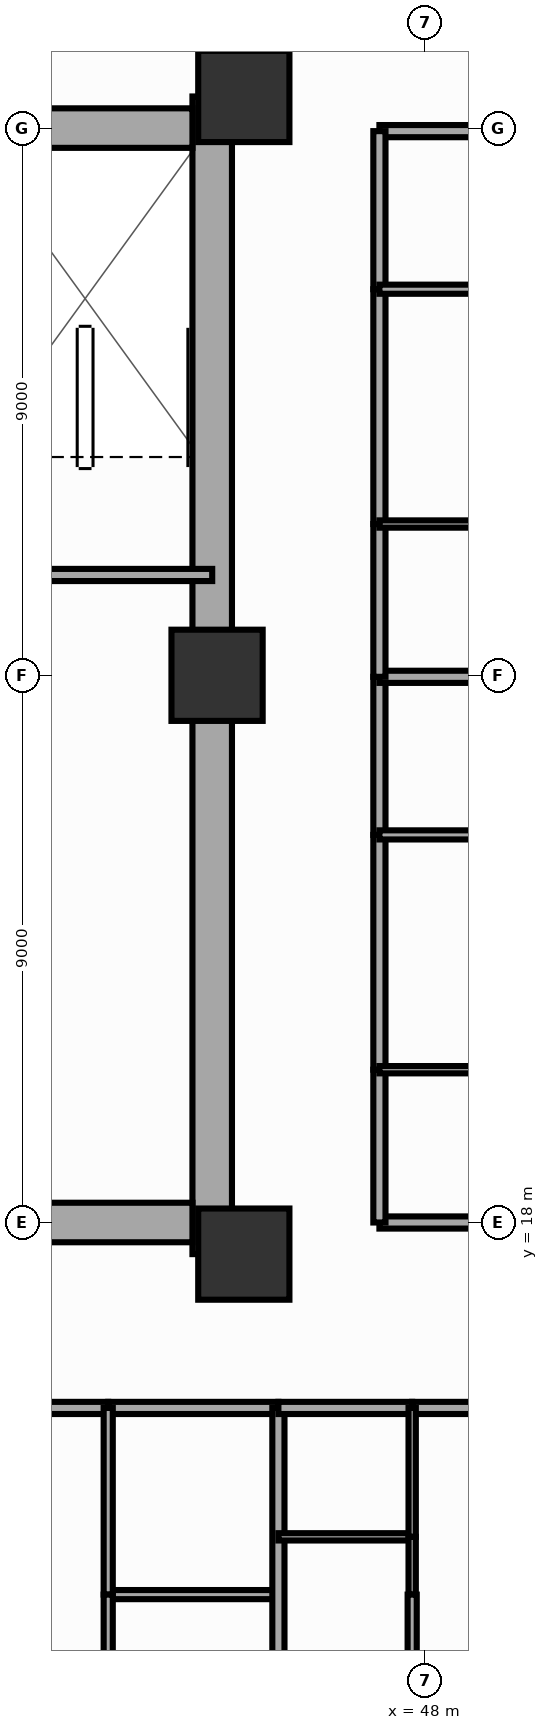
"""IFC4 building model, lengths in metres.
Left out: names, types, materials, properties, quantities, classifications, styles, units other than length and angle.
Written with IfcOpenShell. Run it as: python <this file> out.ifc"""

import sys

from ifc_helpers import new_model, si_unit, direction, frame, frame_2d, origin, origin_2d, place, context, subcontext, project, spatial, rectangle, extrude, source, transform, mapped, element, fill, save


model = new_model("IFC4")
c1 = context("Model", 3, precision=1e-05, world=origin(), true_north=direction((0.0, 1.0)))
c2 = subcontext(c1, "Body", "Model", "MODEL_VIEW")
j1 = project(units=[si_unit("LENGTHUNIT", "METRE"), si_unit("PLANEANGLEUNIT", "RADIAN")], contexts=[c1])
p1 = place(None, origin())
s1 = spatial("IfcSite", under=j1, at=p1, CompositionType="ELEMENT")
p2 = place(p1, origin())
s2 = spatial("IfcBuilding", under=s1, at=p2, CompositionType="ELEMENT")
p3 = place(p2, frame((0.0, 0.0, 19.4)))
s3 = spatial("IfcBuildingStorey", under=s2, at=p3, CompositionType="ELEMENT", Elevation=19.4)
p4 = place(p3, frame((44.5, 17.48, 0.0), z_axis=(0.0, 0.0, 1.0), x_axis=(0.0, 1.0, 0.0)))
e1 = element("IfcWall", 1, at=p4, inside=s3, PredefinedType="SHEAR", context=c2, shape_type="SweptSolid", body=[
    extrude(rectangle(XDim=19.04, YDim=0.65, at=frame_2d((9.52, 0.0))), origin(), (0.0, 0.0, 1.0), 3.0),
])
p5 = place(p4, frame((12.67, 0.0, 0.0), z_axis=(0.0, 0.0, 1.0), x_axis=(-1.0, 0.0, 0.0)))
e2 = element("IfcOpeningElement", 2, at=p5, cuts=e1, PredefinedType="OPENING", context=c2, shape_type="SweptSolid", body=[
    extrude(rectangle(XDim=1.1, YDim=2.15, at=frame_2d((0.55, 1.075))), frame((0.0, 0.337, 0.0), z_axis=(0.0, -1.0, 0.0), x_axis=(1.0, 0.0, 0.0)), (0.0, 0.0, 1.0), 0.674),
])
p6 = place(p3, frame((31.825, 18.0, 0.0), z_axis=(0.0, 0.0, 1.0), x_axis=(1.0, 0.0, 0.0)))
e3 = element("IfcWall", 3, at=p6, inside=s3, PredefinedType="SHEAR", context=c2, shape_type="SweptSolid", body=[
    extrude(rectangle(XDim=12.35, YDim=0.65, at=frame_2d((6.175, 0.0))), origin(), (0.0, 0.0, 1.0), 3.0),
])
p7 = place(p3, frame((31.825, 36.0, 0.0), z_axis=(0.0, 0.0, 1.0), x_axis=(1.0, 0.0, 0.0)))
e4 = element("IfcWall", 4, at=p7, inside=s3, PredefinedType="SHEAR", context=c2, shape_type="SweptSolid", body=[
    extrude(rectangle(XDim=12.35, YDim=0.65, at=frame_2d((6.175, 0.0))), origin(), (0.0, 0.0, 1.0), 3.0),
])
p8 = place(p7, frame((5.125, 0.0, 0.0), z_axis=(0.0, 0.0, 1.0), x_axis=(-1.0, 0.0, 0.0)))
e5 = element("IfcOpeningElement", 5, at=p8, cuts=e4, PredefinedType="OPENING", context=c2, shape_type="SweptSolid", body=[
    extrude(rectangle(XDim=1.4, YDim=2.15, at=frame_2d((0.7, 1.075))), frame((0.0, 0.337, 0.0), z_axis=(0.0, -1.0, 0.0), x_axis=(1.0, 0.0, 0.0)), (0.0, 0.0, 1.0), 0.674),
])
m1 = source(origin(), c2, "Body", "SweptSolid", [
    extrude(rectangle(XDim=1.5, YDim=1.5, at=origin_2d()), origin(), (0.0, 0.0, 1.0), 3.0),
])
for number, where, z_axis, x_axis in (
    (6, (45.02, 17.48, 0.0), (0.0, 0.0, 1.0), (1.0, 0.0, 0.0)),
    (7, (45.02, 36.52, 0.0), (0.0, 0.0, 1.0), (1.0, 0.0, 0.0)),
    (8, (44.58, 27.0, 0.0), (0.0, 0.0, 1.0), (1.0, 0.0, 0.0)),
):
    element("IfcColumn", number, at=place(p3, frame(where, z_axis=z_axis, x_axis=x_axis)), inside=s3, PredefinedType="COLUMN", context=c2, shape_type="MappedRepresentation", body=[
        mapped(m1, transform((0.0, 0.0, 0.0), scale=1.0)),
    ])
p9 = place(p3, frame((40.57, 28.65, 0.0), z_axis=(0.0, 0.0, 1.0), x_axis=(1.0, 0.0, 0.0)))
e9 = element("IfcWall", 9, at=p9, inside=s3, PredefinedType="SOLIDWALL", context=c2, shape_type="SweptSolid", body=[
    extrude(rectangle(XDim=3.93, YDim=0.2, at=frame_2d((1.965, 0.0))), origin(), (0.0, 0.0, 1.0), 2.79),
])
p10 = place(p3, frame((40.423, 14.95, 0.0), z_axis=(0.0, 0.0, 1.0), x_axis=(1.0, 0.0, 0.0)))
e10 = element("IfcWall", 10, at=p10, inside=s3, PredefinedType="PARTITIONING", context=c2, shape_type="SweptSolid", body=[
    extrude(rectangle(XDim=2.367, YDim=0.2, at=frame_2d((1.183, 0.0))), origin(), (0.0, 0.0, 1.0), 2.79),
])
p11 = place(p10, frame((0.683, 0.0, 0.0)))
e11 = element("IfcOpeningElement", 11, at=p11, cuts=e10, PredefinedType="OPENING", context=c2, shape_type="SweptSolid", body=[
    extrude(rectangle(XDim=1.0, YDim=2.15, at=frame_2d((0.5, 1.075))), frame((0.0, 0.112, 0.0), z_axis=(0.0, -1.0, 0.0), x_axis=(1.0, 0.0, 0.0)), (0.0, 0.0, 1.0), 0.224),
])
p12 = place(p3, frame((42.79, 14.95, 0.0), z_axis=(0.0, 0.0, 1.0), x_axis=(1.0, 0.0, 0.0)))
e12 = element("IfcWall", 12, at=p12, inside=s3, PredefinedType="PARTITIONING", context=c2, shape_type="SweptSolid", body=[
    extrude(rectangle(XDim=2.799, YDim=0.2, at=frame_2d((1.399, 0.0))), origin(), (0.0, 0.0, 1.0), 2.79),
])
p13 = place(p3, frame((42.79, 11.88, 0.0), z_axis=(0.0, 0.0, 1.0), x_axis=(1.0, 0.0, 0.0)))
e13 = element("IfcWall", 13, at=p13, inside=s3, PredefinedType="PARTITIONING", context=c2, shape_type="SweptSolid", body=[
    extrude(rectangle(XDim=2.799, YDim=0.15, at=frame_2d((1.399, 0.0))), origin(), (0.0, 0.0, 1.0), 2.79),
])
p14 = place(p3, frame((42.79, 14.95, 0.0), z_axis=(0.0, 0.0, 1.0), x_axis=(0.0, -1.0, 0.0)))
e14 = element("IfcWall", 14, at=p14, inside=s3, PredefinedType="PARTITIONING", context=c2, shape_type="SweptSolid", body=[
    extrude(rectangle(XDim=3.07, YDim=0.15, at=frame_2d((1.535, 0.0))), origin(), (0.0, 0.0, 1.0), 2.79),
])
p15 = place(p14, frame((1.085, 0.0, 0.0)))
e15 = element("IfcOpeningElement", 15, at=p15, cuts=e14, PredefinedType="OPENING", context=c2, shape_type="SweptSolid", body=[
    extrude(rectangle(XDim=0.9, YDim=2.1, at=frame_2d((0.45, 1.05))), frame((0.0, 0.087, 0.0), z_axis=(0.0, -1.0, 0.0), x_axis=(1.0, 0.0, 0.0)), (0.0, 0.0, 1.0), 0.174),
])
p16 = place(p3, frame((42.79, 11.88, 0.0), z_axis=(0.0, 0.0, 1.0), x_axis=(0.0, -1.0, 0.0)))
e16 = element("IfcWall", 16, at=p16, inside=s3, PredefinedType="PARTITIONING", context=c2, shape_type="SweptSolid", body=[
    extrude(rectangle(XDim=8.73, YDim=0.15, at=frame_2d((4.365, 0.0))), origin(), (0.0, 0.0, 1.0), 2.79),
])
p17 = place(p16, frame((3.609, 0.0, 0.0)))
e17 = element("IfcOpeningElement", 17, at=p17, cuts=e16, PredefinedType="OPENING", context=c2, shape_type="SweptSolid", body=[
    extrude(rectangle(XDim=0.9, YDim=2.1, at=frame_2d((0.45, 1.05))), frame((0.0, 0.087, 0.0), z_axis=(0.0, -1.0, 0.0), x_axis=(1.0, 0.0, 0.0)), (0.0, 0.0, 1.0), 0.174),
])
p18 = place(p3, frame((45.589, 14.95, 0.0), z_axis=(0.0, 0.0, 1.0), x_axis=(0.0, -1.0, 0.0)))
e18 = element("IfcWall", 18, at=p18, inside=s3, PredefinedType="PARTITIONING", context=c2, shape_type="SweptSolid", body=[
    extrude(rectangle(XDim=11.8, YDim=0.2, at=frame_2d((5.9, 0.0))), origin(), (0.0, 0.0, 1.0), 2.24),
])
p19 = place(p3, frame((45.589, 14.95, 0.0), z_axis=(0.0, 0.0, 1.0), x_axis=(1.0, 0.0, 0.0)))
e19 = element("IfcWall", 19, at=p19, inside=s3, PredefinedType="PARTITIONING", context=c2, shape_type="SweptSolid", body=[
    extrude(rectangle(XDim=2.2, YDim=0.2, at=frame_2d((1.1, 0.0))), origin(), (0.0, 0.0, 1.0), 2.79),
])
p20 = place(p3, frame((47.789, 14.95, 0.0), z_axis=(0.0, 0.0, 1.0), x_axis=(1.0, 0.0, 0.0)))
e20 = element("IfcWall", 20, at=p20, inside=s3, PredefinedType="PARTITIONING", context=c2, shape_type="SweptSolid", body=[
    extrude(rectangle(XDim=2.367, YDim=0.2, at=frame_2d((1.183, 0.0))), origin(), (0.0, 0.0, 1.0), 2.79),
])
p21 = place(p20, frame((0.683, 0.0, 0.0)))
e21 = element("IfcOpeningElement", 21, at=p21, cuts=e20, PredefinedType="OPENING", context=c2, shape_type="SweptSolid", body=[
    extrude(rectangle(XDim=1.0, YDim=2.15, at=frame_2d((0.5, 1.075))), frame((0.0, 0.112, 0.0), z_axis=(0.0, -1.0, 0.0), x_axis=(1.0, 0.0, 0.0)), (0.0, 0.0, 1.0), 0.224),
])
p22 = place(p3, frame((45.589, 12.83, 0.0), z_axis=(0.0, 0.0, 1.0), x_axis=(1.0, 0.0, 0.0)))
e22 = element("IfcWall", 22, at=p22, inside=s3, PredefinedType="PARTITIONING", context=c2, shape_type="SweptSolid", body=[
    extrude(rectangle(XDim=2.2, YDim=0.12, at=frame_2d((1.1, 0.0))), origin(), (0.0, 0.0, 1.0), 2.79),
])
p23 = place(p3, frame((47.789, 14.95, 0.0), z_axis=(0.0, 0.0, 1.0), x_axis=(0.0, -1.0, 0.0)))
e23 = element("IfcWall", 23, at=p23, inside=s3, PredefinedType="PARTITIONING", context=c2, shape_type="SweptSolid", body=[
    extrude(rectangle(XDim=2.12, YDim=0.12, at=frame_2d((1.06, 0.0))), origin(), (0.0, 0.0, 1.0), 2.79),
])
p24 = place(p23, frame((0.635, 0.0, 0.0)))
e24 = element("IfcOpeningElement", 24, at=p24, cuts=e23, PredefinedType="OPENING", context=c2, shape_type="SweptSolid", body=[
    extrude(rectangle(XDim=0.85, YDim=2.05, at=frame_2d((0.425, 1.025))), frame((0.0, 0.072, 0.0), z_axis=(0.0, -1.0, 0.0), x_axis=(1.0, 0.0, 0.0)), (0.0, 0.0, 1.0), 0.144),
])
p25 = place(p3, frame((47.789, 12.83, 0.0), z_axis=(0.0, 0.0, 1.0), x_axis=(0.0, -1.0, 0.0)))
e25 = element("IfcWall", 25, at=p25, inside=s3, PredefinedType="PARTITIONING", context=c2, shape_type="SweptSolid", body=[
    extrude(rectangle(XDim=0.95, YDim=0.12, at=frame_2d((0.475, 0.0))), origin(), (0.0, 0.0, 1.0), 2.79),
])
p26 = place(p3, frame((47.789, 11.88, 0.0), z_axis=(0.0, 0.0, 1.0), x_axis=(0.0, -1.0, 0.0)))
e26 = element("IfcWall", 26, at=p26, inside=s3, PredefinedType="PARTITIONING", context=c2, shape_type="SweptSolid", body=[
    extrude(rectangle(XDim=8.73, YDim=0.15, at=frame_2d((4.365, 0.0))), origin(), (0.0, 0.0, 1.0), 2.79),
])
p27 = place(p26, frame((3.609, 0.0, 0.0)))
e27 = element("IfcOpeningElement", 27, at=p27, cuts=e26, PredefinedType="OPENING", context=c2, shape_type="SweptSolid", body=[
    extrude(rectangle(XDim=0.9, YDim=2.1, at=frame_2d((0.45, 1.05))), frame((0.0, 0.087, 0.0), z_axis=(0.0, -1.0, 0.0), x_axis=(1.0, 0.0, 0.0)), (0.0, 0.0, 1.0), 0.174),
])
for number, where, z_axis, x_axis in (
    (28, (47.25, 18.0, 0.0), (0.0, 0.0, 1.0), (1.0, 0.0, 0.0)),
    (29, (47.25, 35.95, 0.0), (0.0, 0.0, 1.0), (1.0, 0.0, 0.0)),
):
    element("IfcWall", number, at=place(p3, frame(where, z_axis=z_axis, x_axis=x_axis)), inside=s3, PredefinedType="PARTITIONING", context=c2, shape_type="SweptSolid", body=[
        extrude(rectangle(XDim=16.6, YDim=0.2, at=frame_2d((8.3, 0.0))), origin(), (0.0, 0.0, 1.0), 2.24),
    ])
p28 = place(p3, frame((47.25, 18.0, 0.0), z_axis=(0.0, 0.0, 1.0), x_axis=(0.0, 1.0, 0.0)))
e30 = element("IfcWall", 30, at=p28, inside=s3, PredefinedType="PARTITIONING", context=c2, shape_type="SweptSolid", body=[
    extrude(rectangle(XDim=2.513, YDim=0.2, at=frame_2d((1.256, 0.0))), origin(), (0.0, 0.0, 1.0), 2.79),
])
p29 = place(p3, frame((47.25, 20.513, 0.0), z_axis=(0.0, 0.0, 1.0), x_axis=(0.0, 1.0, 0.0)))
e31 = element("IfcWall", 31, at=p29, inside=s3, PredefinedType="PARTITIONING", context=c2, shape_type="SweptSolid", body=[
    extrude(rectangle(XDim=3.862, YDim=0.2, at=frame_2d((1.931, 0.0))), origin(), (0.0, 0.0, 1.0), 2.79),
])
p30 = place(p29, frame((1.431, 0.0, 0.0)))
e32 = element("IfcOpeningElement", 32, at=p30, cuts=e31, PredefinedType="OPENING", context=c2, shape_type="SweptSolid", body=[
    extrude(rectangle(XDim=1.0, YDim=2.15, at=frame_2d((0.5, 1.075))), frame((0.0, 0.112, 0.0), z_axis=(0.0, -1.0, 0.0), x_axis=(1.0, 0.0, 0.0)), (0.0, 0.0, 1.0), 0.224),
])
p31 = place(p3, frame((47.25, 24.375, 0.0), z_axis=(0.0, 0.0, 1.0), x_axis=(0.0, 1.0, 0.0)))
e33 = element("IfcWall", 33, at=p31, inside=s3, PredefinedType="PARTITIONING", context=c2, shape_type="SweptSolid", body=[
    extrude(rectangle(XDim=2.6, YDim=0.2, at=frame_2d((1.3, 0.0))), origin(), (0.0, 0.0, 1.0), 2.79),
])
p32 = place(p3, frame((47.25, 20.513, 0.0), z_axis=(0.0, 0.0, 1.0), x_axis=(1.0, 0.0, 0.0)))
e34 = element("IfcWall", 34, at=p32, inside=s3, PredefinedType="PARTITIONING", context=c2, shape_type="SweptSolid", body=[
    extrude(rectangle(XDim=2.12, YDim=0.12, at=frame_2d((1.06, 0.0))), origin(), (0.0, 0.0, 1.0), 2.79),
])
p33 = place(p32, frame((0.635, 0.0, 0.0)))
e35 = element("IfcOpeningElement", 35, at=p33, cuts=e34, PredefinedType="OPENING", context=c2, shape_type="SweptSolid", body=[
    extrude(rectangle(XDim=0.85, YDim=2.05, at=frame_2d((0.425, 1.025))), frame((0.0, 0.072, 0.0), z_axis=(0.0, -1.0, 0.0), x_axis=(1.0, 0.0, 0.0)), (0.0, 0.0, 1.0), 0.144),
])
p34 = place(p3, frame((47.25, 24.375, 0.0), z_axis=(0.0, 0.0, 1.0), x_axis=(1.0, 0.0, 0.0)))
e36 = element("IfcWall", 36, at=p34, inside=s3, PredefinedType="PARTITIONING", context=c2, shape_type="SweptSolid", body=[
    extrude(rectangle(XDim=3.07, YDim=0.15, at=frame_2d((1.535, 0.0))), origin(), (0.0, 0.0, 1.0), 2.79),
])
p35 = place(p34, frame((1.085, 0.0, 0.0)))
e37 = element("IfcOpeningElement", 37, at=p35, cuts=e36, PredefinedType="OPENING", context=c2, shape_type="SweptSolid", body=[
    extrude(rectangle(XDim=0.9, YDim=2.1, at=frame_2d((0.45, 1.05))), frame((0.0, 0.087, 0.0), z_axis=(0.0, -1.0, 0.0), x_axis=(1.0, 0.0, 0.0)), (0.0, 0.0, 1.0), 0.174),
])
p36 = place(p3, frame((47.25, 26.975, 0.0), z_axis=(0.0, 0.0, 1.0), x_axis=(1.0, 0.0, 0.0)))
e38 = element("IfcWall", 38, at=p36, inside=s3, PredefinedType="PARTITIONING", context=c2, shape_type="SweptSolid", body=[
    extrude(rectangle(XDim=16.6, YDim=0.2, at=frame_2d((8.3, 0.0))), origin(), (0.0, 0.0, 1.0), 2.79),
])
p37 = place(p3, frame((47.25, 26.975, 0.0), z_axis=(0.0, 0.0, 1.0), x_axis=(0.0, 1.0, 0.0)))
e39 = element("IfcWall", 39, at=p37, inside=s3, PredefinedType="PARTITIONING", context=c2, shape_type="SweptSolid", body=[
    extrude(rectangle(XDim=2.513, YDim=0.2, at=frame_2d((1.256, 0.0))), origin(), (0.0, 0.0, 1.0), 2.79),
])
p38 = place(p3, frame((47.25, 29.488, 0.0), z_axis=(0.0, 0.0, 1.0), x_axis=(0.0, 1.0, 0.0)))
e40 = element("IfcWall", 40, at=p38, inside=s3, PredefinedType="PARTITIONING", context=c2, shape_type="SweptSolid", body=[
    extrude(rectangle(XDim=3.862, YDim=0.2, at=frame_2d((1.931, 0.0))), origin(), (0.0, 0.0, 1.0), 2.79),
])
p39 = place(p38, frame((1.431, 0.0, 0.0)))
e41 = element("IfcOpeningElement", 41, at=p39, cuts=e40, PredefinedType="OPENING", context=c2, shape_type="SweptSolid", body=[
    extrude(rectangle(XDim=1.0, YDim=2.15, at=frame_2d((0.5, 1.075))), frame((0.0, 0.112, 0.0), z_axis=(0.0, -1.0, 0.0), x_axis=(1.0, 0.0, 0.0)), (0.0, 0.0, 1.0), 0.224),
])
p40 = place(p3, frame((47.25, 33.35, 0.0), z_axis=(0.0, 0.0, 1.0), x_axis=(0.0, 1.0, 0.0)))
e42 = element("IfcWall", 42, at=p40, inside=s3, PredefinedType="PARTITIONING", context=c2, shape_type="SweptSolid", body=[
    extrude(rectangle(XDim=2.6, YDim=0.2, at=frame_2d((1.3, 0.0))), origin(), (0.0, 0.0, 1.0), 2.79),
])
p41 = place(p3, frame((47.25, 29.488, 0.0), z_axis=(0.0, 0.0, 1.0), x_axis=(1.0, 0.0, 0.0)))
e43 = element("IfcWall", 43, at=p41, inside=s3, PredefinedType="PARTITIONING", context=c2, shape_type="SweptSolid", body=[
    extrude(rectangle(XDim=2.12, YDim=0.12, at=frame_2d((1.06, 0.0))), origin(), (0.0, 0.0, 1.0), 2.79),
])
p42 = place(p41, frame((0.635, 0.0, 0.0)))
e44 = element("IfcOpeningElement", 44, at=p42, cuts=e43, PredefinedType="OPENING", context=c2, shape_type="SweptSolid", body=[
    extrude(rectangle(XDim=0.85, YDim=2.05, at=frame_2d((0.425, 1.025))), frame((0.0, 0.072, 0.0), z_axis=(0.0, -1.0, 0.0), x_axis=(1.0, 0.0, 0.0)), (0.0, 0.0, 1.0), 0.144),
])
p43 = place(p3, frame((47.25, 33.35, 0.0), z_axis=(0.0, 0.0, 1.0), x_axis=(1.0, 0.0, 0.0)))
e45 = element("IfcWall", 45, at=p43, inside=s3, PredefinedType="PARTITIONING", context=c2, shape_type="SweptSolid", body=[
    extrude(rectangle(XDim=3.07, YDim=0.15, at=frame_2d((1.535, 0.0))), origin(), (0.0, 0.0, 1.0), 2.79),
])
p44 = place(p43, frame((1.085, 0.0, 0.0)))
e46 = element("IfcOpeningElement", 46, at=p44, cuts=e45, PredefinedType="OPENING", context=c2, shape_type="SweptSolid", body=[
    extrude(rectangle(XDim=0.9, YDim=2.1, at=frame_2d((0.45, 1.05))), frame((0.0, 0.087, 0.0), z_axis=(0.0, -1.0, 0.0), x_axis=(1.0, 0.0, 0.0)), (0.0, 0.0, 1.0), 0.174),
])
m2 = source(origin(), c2, "Body", "SweptSolid", [
    extrude(rectangle(XDim=1.1, YDim=2.15, at=frame_2d((0.55, 1.075))), frame((0.0, 0.025, 0.0), z_axis=(0.0, -1.0, 0.0), x_axis=(1.0, 0.0, 0.0)), (0.0, 0.0, 1.0), 0.05),
])
p45 = place(p5, origin())
e47 = element("IfcDoor", 47, at=p45, inside=s3, OperationType="SINGLE_SWING_RIGHT", PredefinedType="DOOR", context=c2, shape_type="MappedRepresentation", body=[
    mapped(m2, transform((0.0, 0.0, 0.0), scale=1.0)),
])
fill(e2, e47)
m3 = source(origin(), c2, "Body", "SweptSolid", [
    extrude(rectangle(XDim=1.0, YDim=2.15, at=frame_2d((0.5, 1.075))), frame((0.0, 0.025, 0.0), z_axis=(0.0, -1.0, 0.0), x_axis=(1.0, 0.0, 0.0)), (0.0, 0.0, 1.0), 0.05),
])
p46 = place(p11, origin())
e48 = element("IfcDoor", 48, at=p46, inside=s3, OperationType="SINGLE_SWING_RIGHT", PredefinedType="DOOR", context=c2, shape_type="MappedRepresentation", body=[
    mapped(m3, transform((0.0, 0.0, 0.0), scale=1.0)),
])
fill(e11, e48)
m4 = source(origin(), c2, "Body", "SweptSolid", [
    extrude(rectangle(XDim=0.9, YDim=2.1, at=frame_2d((0.45, 1.05))), frame((0.0, 0.025, 0.0), z_axis=(0.0, -1.0, 0.0), x_axis=(1.0, 0.0, 0.0)), (0.0, 0.0, 1.0), 0.05),
])
p47 = place(p15, origin())
e49 = element("IfcDoor", 49, at=p47, inside=s3, OperationType="SINGLE_SWING_LEFT", PredefinedType="DOOR", context=c2, shape_type="MappedRepresentation", body=[
    mapped(m4, transform((0.0, 0.0, 0.0), scale=1.0)),
])
fill(e15, e49)
p48 = place(p21, origin())
e50 = element("IfcDoor", 50, at=p48, inside=s3, OperationType="SINGLE_SWING_LEFT", PredefinedType="DOOR", context=c2, shape_type="MappedRepresentation", body=[
    mapped(m3, transform((0.0, 0.0, 0.0), scale=1.0)),
])
fill(e21, e50)
m5 = source(origin(), c2, "Body", "SweptSolid", [
    extrude(rectangle(XDim=0.85, YDim=2.05, at=frame_2d((0.425, 1.025))), frame((0.0, 0.025, 0.0), z_axis=(0.0, -1.0, 0.0), x_axis=(1.0, 0.0, 0.0)), (0.0, 0.0, 1.0), 0.05),
])
p49 = place(p24, origin())
e51 = element("IfcDoor", 51, at=p49, inside=s3, OperationType="SINGLE_SWING_RIGHT", PredefinedType="DOOR", context=c2, shape_type="MappedRepresentation", body=[
    mapped(m5, transform((0.0, 0.0, 0.0), scale=1.0)),
])
fill(e24, e51)
p50 = place(p30, origin())
e52 = element("IfcDoor", 52, at=p50, inside=s3, OperationType="SINGLE_SWING_RIGHT", PredefinedType="DOOR", context=c2, shape_type="MappedRepresentation", body=[
    mapped(m3, transform((0.0, 0.0, 0.0), scale=1.0)),
])
fill(e32, e52)
p51 = place(p33, origin())
e53 = element("IfcDoor", 53, at=p51, inside=s3, OperationType="SINGLE_SWING_LEFT", PredefinedType="DOOR", context=c2, shape_type="MappedRepresentation", body=[
    mapped(m5, transform((0.0, 0.0, 0.0), scale=1.0)),
])
fill(e35, e53)
p52 = place(p35, origin())
e54 = element("IfcDoor", 54, at=p52, inside=s3, OperationType="SINGLE_SWING_LEFT", PredefinedType="DOOR", context=c2, shape_type="MappedRepresentation", body=[
    mapped(m4, transform((0.0, 0.0, 0.0), scale=1.0)),
])
fill(e37, e54)
p53 = place(p39, origin())
e55 = element("IfcDoor", 55, at=p53, inside=s3, OperationType="SINGLE_SWING_LEFT", PredefinedType="DOOR", context=c2, shape_type="MappedRepresentation", body=[
    mapped(m3, transform((0.0, 0.0, 0.0), scale=1.0)),
])
fill(e41, e55)
p54 = place(p42, origin())
e56 = element("IfcDoor", 56, at=p54, inside=s3, OperationType="SINGLE_SWING_RIGHT", PredefinedType="DOOR", context=c2, shape_type="MappedRepresentation", body=[
    mapped(m5, transform((0.0, 0.0, 0.0), scale=1.0)),
])
fill(e44, e56)
p55 = place(p44, origin())
e57 = element("IfcDoor", 57, at=p55, inside=s3, OperationType="SINGLE_SWING_RIGHT", PredefinedType="DOOR", context=c2, shape_type="MappedRepresentation", body=[
    mapped(m4, transform((0.0, 0.0, 0.0), scale=1.0)),
])
fill(e46, e57)
save(model, sys.argv[1])
